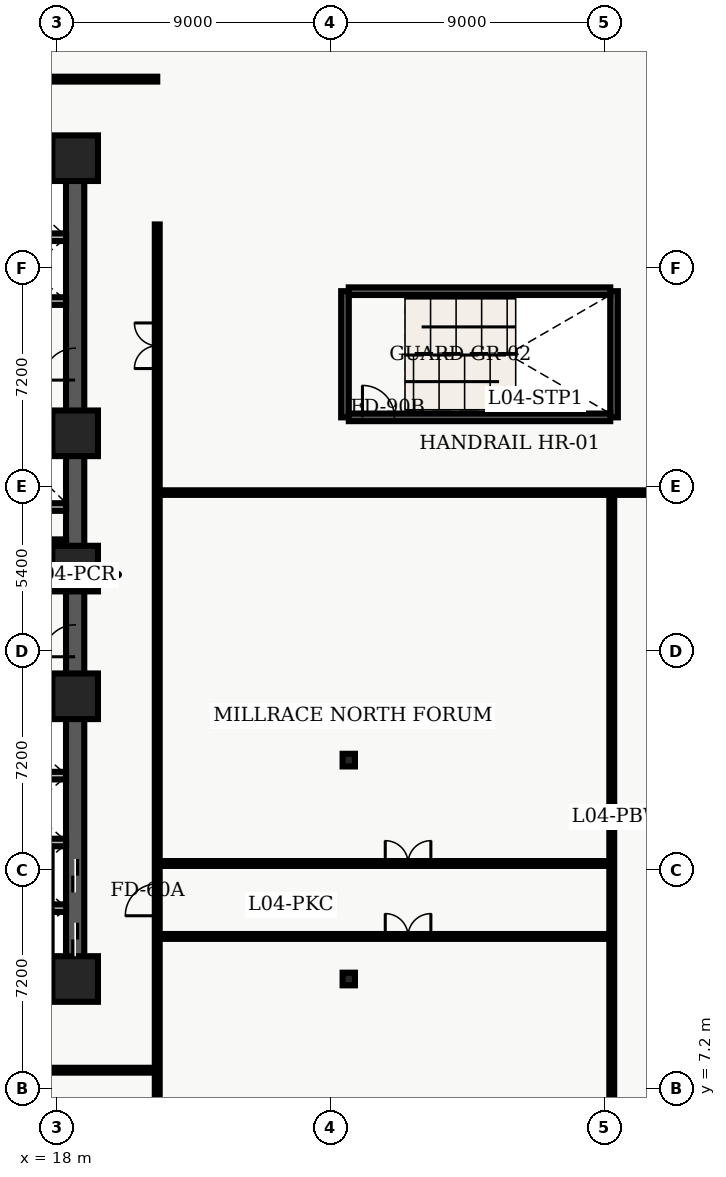
"""IFC4 building model, lengths in metres.
Left out: names, types, materials, properties, quantities, classifications, styles, units other than length and angle.
Written with IfcOpenShell. Run it as: python <this file> out.ifc"""

import sys

from ifc_helpers import new_model, entity, si_unit, converted_unit, direction, frame, origin_with_axes, origin_2d_with_axis, place, context, subcontext, project, spatial, polyline, rectangle, i_section, outline, extrude, element, fill, save


model = new_model("IFC4")
c1 = context("Model", 3, precision=1e-05, world=origin_with_axes(), true_north=direction((0.0, 1.0)))
c2 = subcontext(c1, "Body", "Model", "MODEL_VIEW")
j1 = project(units=[si_unit("LENGTHUNIT", "METRE"), converted_unit("PLANEANGLEUNIT", "DEGREE", entity("IfcPlaneAngleMeasure", 0.017), si_unit("PLANEANGLEUNIT", "RADIAN"), dimensions=[0, 0, 0, 0, 0, 0, 0])], contexts=[c1])
p1 = place(None, origin_with_axes())
s1 = spatial("IfcSite", under=j1, at=p1, CompositionType="ELEMENT")
p2 = place(p1, origin_with_axes())
s2 = spatial("IfcBuilding", under=s1, at=p2, CompositionType="ELEMENT")
p3 = place(p2, frame((0.0, 0.0, 19.8), z_axis=(0.0, 0.0, 1.0), x_axis=(1.0, 0.0, 0.0)))
s3 = spatial("IfcBuildingStorey", under=s2, at=p3, CompositionType="ELEMENT", Elevation=19.8)
p4 = place(p3, frame((11.4, 10.8, 0.0), z_axis=(0.0, 0.0, 1.0), x_axis=(1.0, 0.0, 0.0)))
e1 = element("IfcWall", 1, at=p4, inside=s3, PredefinedType="SHEAR", context=c2, shape_type="SweptSolid", body=[
    extrude(outline(polyline([(0.0, -0.3), (7.2, -0.3), (7.2, 0.3), (0.0, 0.3), (0.0, -0.3)])), origin_with_axes(), (0.0, 0.0, 1.0), 4.26),
])
p5 = place(p4, frame((2.625, 0.0, 0.0), z_axis=(0.0, 0.0, 1.0), x_axis=(1.0, 0.0, 0.0)))
e2 = element("IfcOpeningElement", 2, at=p5, cuts=e1, PredefinedType="OPENING", context=c2, shape_type="SweptSolid", body=[
    extrude(rectangle(XDim=1.05, YDim=0.62, at=origin_2d_with_axis()), origin_with_axes(), (0.0, 0.0, 1.0), 2.15),
])
p6 = place(p3, frame((11.4, 37.8, 0.0), z_axis=(0.0, 0.0, 1.0), x_axis=(1.0, 0.0, 0.0)))
e3 = element("IfcWall", 3, at=p6, inside=s3, PredefinedType="SHEAR", context=c2, shape_type="SweptSolid", body=[
    extrude(outline(polyline([(0.0, -0.3), (7.2, -0.3), (7.2, 0.3), (0.0, 0.3), (0.0, -0.3)])), origin_with_axes(), (0.0, 0.0, 1.0), 4.26),
])
p7 = place(p6, frame((2.625, 0.0, 0.0), z_axis=(0.0, 0.0, 1.0), x_axis=(1.0, 0.0, 0.0)))
e4 = element("IfcOpeningElement", 4, at=p7, cuts=e3, PredefinedType="OPENING", context=c2, shape_type="SweptSolid", body=[
    extrude(rectangle(XDim=1.05, YDim=0.62, at=origin_2d_with_axis()), origin_with_axes(), (0.0, 0.0, 1.0), 2.15),
])
p8 = place(p3, frame((18.6, 10.8, 0.0), z_axis=(0.0, 0.0, 1.0), x_axis=(0.0, 1.0, 0.0)))
e5 = element("IfcWall", 5, at=p8, inside=s3, PredefinedType="SHEAR", context=c2, shape_type="SweptSolid", body=[
    extrude(outline(polyline([(0.0, -0.3), (13.5, -0.3), (13.5, 0.3), (0.0, 0.3), (0.0, -0.3)])), origin_with_axes(), (0.0, 0.0, 1.0), 4.26),
])
p9 = place(p8, frame((1.3, 0.0, 0.0), z_axis=(0.0, 0.0, 1.0), x_axis=(1.0, 0.0, 0.0)))
e6 = element("IfcOpeningElement", 6, at=p9, cuts=e5, PredefinedType="OPENING", context=c2, shape_type="SweptSolid", body=[
    extrude(rectangle(XDim=1.1, YDim=0.62, at=origin_2d_with_axis()), origin_with_axes(), (0.0, 0.0, 1.0), 2.15),
])
p10 = place(p8, frame((3.4, 0.0, 0.0), z_axis=(0.0, 0.0, 1.0), x_axis=(1.0, 0.0, 0.0)))
e7 = element("IfcOpeningElement", 7, at=p10, cuts=e5, PredefinedType="OPENING", context=c2, shape_type="SweptSolid", body=[
    extrude(rectangle(XDim=1.1, YDim=0.62, at=origin_2d_with_axis()), origin_with_axes(), (0.0, 0.0, 1.0), 2.15),
])
p11 = place(p8, frame((11.125, 0.0, 0.0), z_axis=(0.0, 0.0, 1.0), x_axis=(1.0, 0.0, 0.0)))
e8 = element("IfcOpeningElement", 8, at=p11, cuts=e5, PredefinedType="OPENING", context=c2, shape_type="SweptSolid", body=[
    extrude(rectangle(XDim=1.05, YDim=0.62, at=origin_2d_with_axis()), origin_with_axes(), (0.0, 0.0, 1.0), 2.15),
])
p12 = place(p3, frame((18.6, 24.3, 0.0), z_axis=(0.0, 0.0, 1.0), x_axis=(0.0, 1.0, 0.0)))
e9 = element("IfcWall", 9, at=p12, inside=s3, PredefinedType="SHEAR", context=c2, shape_type="SweptSolid", body=[
    extrude(outline(polyline([(0.0, -0.3), (13.5, -0.3), (13.5, 0.3), (0.0, 0.3), (0.0, -0.3)])), origin_with_axes(), (0.0, 0.0, 1.0), 4.26),
])
p13 = place(p12, frame((6.725, 0.0, 0.0), z_axis=(0.0, 0.0, 1.0), x_axis=(1.0, 0.0, 0.0)))
e10 = element("IfcOpeningElement", 10, at=p13, cuts=e9, PredefinedType="OPENING", context=c2, shape_type="SweptSolid", body=[
    extrude(rectangle(XDim=1.05, YDim=0.62, at=origin_2d_with_axis()), origin_with_axes(), (0.0, 0.0, 1.0), 2.15),
])
for number, where, z_axis, x_axis in (
    (11, (11.7, 19.825, 0.0), (0.0, 0.0, 1.0), (1.0, 0.0, 0.0)),
    (12, (11.7, 28.775, 0.0), (0.0, 0.0, 1.0), (1.0, 0.0, 0.0)),
):
    element("IfcWall", number, at=place(p3, frame(where, z_axis=z_axis, x_axis=x_axis)), inside=s3, PredefinedType="SHEAR", context=c2, shape_type="SweptSolid", body=[
        extrude(outline(polyline([(0.0, -0.125), (6.6, -0.125), (6.6, 0.125), (0.0, 0.125), (0.0, -0.125)])), origin_with_axes(), (0.0, 0.0, 1.0), 4.26),
    ])
p14 = place(p3, frame((11.7, 24.1, 0.0), z_axis=(0.0, 0.0, 1.0), x_axis=(1.0, 0.0, 0.0)))
e13 = element("IfcWall", 13, at=p14, inside=s3, PredefinedType="SOLIDWALL", context=c2, shape_type="SweptSolid", body=[
    extrude(outline(polyline([(0.0, -0.125), (6.6, -0.125), (6.6, 0.125), (0.0, 0.125), (0.0, -0.125)])), origin_with_axes(), (0.0, 0.0, 1.0), 3.3),
])
p15 = place(p14, frame((3.75, 0.0, 0.0), z_axis=(0.0, 0.0, 1.0), x_axis=(1.0, 0.0, 0.0)))
e14 = element("IfcOpeningElement", 14, at=p15, cuts=e13, PredefinedType="OPENING", context=c2, shape_type="SweptSolid", body=[
    extrude(rectangle(XDim=0.9, YDim=0.27, at=origin_2d_with_axis()), origin_with_axes(), (0.0, 0.0, 1.0), 2.15),
])
p16 = place(p3, frame((11.7, 26.325, 0.0), z_axis=(0.0, 0.0, 1.0), x_axis=(1.0, 0.0, 0.0)))
e15 = element("IfcWall", 15, at=p16, inside=s3, PredefinedType="SOLIDWALL", context=c2, shape_type="SweptSolid", body=[
    extrude(outline(polyline([(0.0, -0.125), (6.6, -0.125), (6.6, 0.125), (0.0, 0.125), (0.0, -0.125)])), origin_with_axes(), (0.0, 0.0, 1.0), 3.3),
])
p17 = place(p16, frame((3.5, 0.0, 0.0), z_axis=(0.0, 0.0, 1.0), x_axis=(1.0, 0.0, 0.0)))
e16 = element("IfcOpeningElement", 16, at=p17, cuts=e15, PredefinedType="OPENING", context=c2, shape_type="SweptSolid", body=[
    extrude(rectangle(XDim=0.9, YDim=0.27, at=origin_2d_with_axis()), origin_with_axes(), (0.0, 0.0, 1.0), 2.15),
])
for number, where, z_axis, x_axis in (
    (17, (27.475, 29.275, 0.0), (0.0, 0.0, 1.0), (0.0, 1.0, 0.0)),
    (18, (36.325, 29.275, 0.0), (0.0, 0.0, 1.0), (0.0, 1.0, 0.0)),
):
    element("IfcWall", number, at=place(p3, frame(where, z_axis=z_axis, x_axis=x_axis)), inside=s3, PredefinedType="SHEAR", context=c2, shape_type="SweptSolid", body=[
        extrude(outline(polyline([(0.0, -0.125), (4.15, -0.125), (4.15, 0.125), (0.0, 0.125), (0.0, -0.125)])), origin_with_axes(), (0.0, 0.0, 1.0), 4.26),
    ])
p18 = place(p3, frame((27.6, 29.275, 0.0), z_axis=(0.0, 0.0, 1.0), x_axis=(1.0, 0.0, 0.0)))
e19 = element("IfcWall", 19, at=p18, inside=s3, PredefinedType="SHEAR", context=c2, shape_type="SweptSolid", body=[
    extrude(outline(polyline([(0.0, -0.125), (8.6, -0.125), (8.6, 0.125), (0.0, 0.125), (0.0, -0.125)])), origin_with_axes(), (0.0, 0.0, 1.0), 4.26),
])
p19 = place(p18, frame((0.975, 0.0, 0.0), z_axis=(0.0, 0.0, 1.0), x_axis=(1.0, 0.0, 0.0)))
e20 = element("IfcOpeningElement", 20, at=p19, cuts=e19, PredefinedType="OPENING", context=c2, shape_type="SweptSolid", body=[
    extrude(rectangle(XDim=1.05, YDim=0.27, at=origin_2d_with_axis()), origin_with_axes(), (0.0, 0.0, 1.0), 2.15),
])
p20 = place(p3, frame((27.6, 33.425, 0.0), z_axis=(0.0, 0.0, 1.0), x_axis=(1.0, 0.0, 0.0)))
e21 = element("IfcWall", 21, at=p20, inside=s3, PredefinedType="SHEAR", context=c2, shape_type="SweptSolid", body=[
    extrude(outline(polyline([(0.0, -0.125), (8.6, -0.125), (8.6, 0.125), (0.0, 0.125), (0.0, -0.125)])), origin_with_axes(), (0.0, 0.0, 1.0), 4.26),
])
for number, where, z_axis, x_axis in (
    (22, (18.6, 10.8, 0.0), (0.0, 0.0, 1.0), (1.0, 0.0, 0.0)),
    (23, (18.6, 20.1, 0.0), (0.0, 0.0, 1.0), (1.0, 0.0, 0.0)),
    (24, (18.6, 24.3, 0.0), (0.0, 0.0, 1.0), (1.0, 0.0, 0.0)),
    (25, (18.6, 28.75, 0.0), (0.0, 0.0, 1.0), (1.0, 0.0, 0.0)),
    (26, (18.6, 37.8, 0.0), (0.0, 0.0, 1.0), (1.0, 0.0, 0.0)),
):
    element("IfcColumn", number, at=place(p3, frame(where, z_axis=z_axis, x_axis=x_axis)), inside=s3, PredefinedType="COLUMN", context=c2, shape_type="SweptSolid", body=[
        extrude(rectangle(XDim=1.5, YDim=1.5, at=origin_2d_with_axis()), origin_with_axes(), (0.0, 0.0, 1.0), 4.5),
    ])
for number, where, z_axis, x_axis in (
    (27, (27.6, 10.8, 0.0), (0.0, 0.0, 1.0), (1.0, 0.0, 0.0)),
    (28, (27.6, 18.0, 0.0), (0.0, 0.0, 1.0), (1.0, 0.0, 0.0)),
):
    element("IfcColumn", number, at=place(p3, frame(where, z_axis=z_axis, x_axis=x_axis)), inside=s3, PredefinedType="COLUMN", context=c2, shape_type="SweptSolid", body=[
        extrude(i_section(OverallWidth=0.406, OverallDepth=0.416, WebThickness=0.03, FlangeThickness=0.048, FilletRadius=0.022, at=origin_2d_with_axis()), origin_with_axes(), (0.0, 0.0, 1.0), 4.5),
    ])
p21 = place(p3, frame((14.62, 25.18, 0.0), z_axis=(0.0, 0.0, 1.0), x_axis=(1.0, 0.0, 0.0)))
e29 = element("IfcWall", 29, at=p21, inside=s3, PredefinedType="PARTITIONING", context=c2, shape_type="SweptSolid", body=[
    extrude(outline(polyline([(0.0, -0.08), (3.68, -0.08), (3.68, 0.08), (0.0, 0.08), (0.0, -0.08)])), origin_with_axes(), (0.0, 0.0, 1.0), 3.2),
])
p22 = place(p21, frame((1.95, 0.0, 0.0), z_axis=(0.0, 0.0, 1.0), x_axis=(1.0, 0.0, 0.0)))
e30 = element("IfcOpeningElement", 30, at=p22, cuts=e29, PredefinedType="OPENING", context=c2, shape_type="SweptSolid", body=[
    extrude(rectangle(XDim=0.9, YDim=0.18, at=origin_2d_with_axis()), origin_with_axes(), (0.0, 0.0, 1.0), 2.15),
])
for number, where, z_axis, x_axis in (
    (31, (15.84, 13.13, 0.0), (0.0, 0.0, 1.0), (1.0, 0.0, 0.0)),
    (32, (15.84, 15.29, 0.0), (0.0, 0.0, 1.0), (1.0, 0.0, 0.0)),
    (33, (15.84, 17.49, 0.0), (0.0, 0.0, 1.0), (1.0, 0.0, 0.0)),
    (34, (15.84, 33.1, 0.0), (0.0, 0.0, 1.0), (1.0, 0.0, 0.0)),
    (35, (15.84, 35.2, 0.0), (0.0, 0.0, 1.0), (1.0, 0.0, 0.0)),
):
    element("IfcWall", number, at=place(p3, frame(where, z_axis=z_axis, x_axis=x_axis)), inside=s3, PredefinedType="SOLIDWALL", context=c2, shape_type="SweptSolid", body=[
        extrude(outline(polyline([(0.0, -0.125), (2.46, -0.125), (2.46, 0.125), (0.0, 0.125), (0.0, -0.125)])), origin_with_axes(), (0.0, 0.0, 1.0), 3.2),
    ])
p23 = place(p3, frame((0.38, 7.8, 0.0), z_axis=(0.0, 0.0, 1.0), x_axis=(1.0, 0.0, 0.0)))
e36 = element("IfcWall", 36, at=p23, inside=s3, PredefinedType="PARTITIONING", context=c2, shape_type="SweptSolid", body=[
    extrude(outline(polyline([(0.0, -0.08), (20.92, -0.08), (20.92, 0.08), (0.0, 0.08), (0.0, -0.08)])), origin_with_axes(), (0.0, 0.0, 1.0), 3.2),
])
p24 = place(p23, frame((3.7, 0.0, 0.0), z_axis=(0.0, 0.0, 1.0), x_axis=(1.0, 0.0, 0.0)))
e37 = element("IfcOpeningElement", 37, at=p24, cuts=e36, PredefinedType="OPENING", context=c2, shape_type="SweptSolid", body=[
    extrude(rectangle(XDim=1.0, YDim=0.18, at=origin_2d_with_axis()), origin_with_axes(), (0.0, 0.0, 1.0), 2.15),
])
p25 = place(p23, frame((15.3, 0.0, 0.0), z_axis=(0.0, 0.0, 1.0), x_axis=(1.0, 0.0, 0.0)))
e38 = element("IfcOpeningElement", 38, at=p25, cuts=e36, PredefinedType="OPENING", context=c2, shape_type="SweptSolid", body=[
    extrude(rectangle(XDim=1.0, YDim=0.18, at=origin_2d_with_axis()), origin_with_axes(), (0.0, 0.0, 1.0), 2.15),
])
p26 = place(p3, frame((0.38, 40.4, 0.0), z_axis=(0.0, 0.0, 1.0), x_axis=(1.0, 0.0, 0.0)))
e39 = element("IfcWall", 39, at=p26, inside=s3, PredefinedType="PARTITIONING", context=c2, shape_type="SweptSolid", body=[
    extrude(outline(polyline([(0.0, -0.08), (20.92, -0.08), (20.92, 0.08), (0.0, 0.08), (0.0, -0.08)])), origin_with_axes(), (0.0, 0.0, 1.0), 3.2),
])
p27 = place(p26, frame((15.25, 0.0, 0.0), z_axis=(0.0, 0.0, 1.0), x_axis=(1.0, 0.0, 0.0)))
e40 = element("IfcOpeningElement", 40, at=p27, cuts=e39, PredefinedType="OPENING", context=c2, shape_type="SweptSolid", body=[
    extrude(rectangle(XDim=1.5, YDim=0.18, at=origin_2d_with_axis()), origin_with_axes(), (0.0, 0.0, 1.0), 2.2),
])
p28 = place(p3, frame((21.3, 0.38, 0.0), z_axis=(0.0, 0.0, 1.0), x_axis=(0.0, 1.0, 0.0)))
e41 = element("IfcWall", 41, at=p28, inside=s3, PredefinedType="PARTITIONING", context=c2, shape_type="SweptSolid", body=[
    extrude(outline(polyline([(0.0, -0.08), (35.24, -0.08), (35.24, 0.08), (0.0, 0.08), (0.0, -0.08)])), origin_with_axes(), (0.0, 0.0, 1.0), 3.2),
])
p29 = place(p28, frame((13.025, 0.0, 0.0), z_axis=(0.0, 0.0, 1.0), x_axis=(1.0, 0.0, 0.0)))
e42 = element("IfcOpeningElement", 42, at=p29, cuts=e41, PredefinedType="OPENING", context=c2, shape_type="SweptSolid", body=[
    extrude(rectangle(XDim=1.05, YDim=0.18, at=origin_2d_with_axis()), origin_with_axes(), (0.0, 0.0, 1.0), 2.15),
])
p30 = place(p28, frame((31.25, 0.0, 0.0), z_axis=(0.0, 0.0, 1.0), x_axis=(1.0, 0.0, 0.0)))
e43 = element("IfcOpeningElement", 43, at=p30, cuts=e41, PredefinedType="OPENING", context=c2, shape_type="SweptSolid", body=[
    extrude(rectangle(XDim=1.5, YDim=0.18, at=origin_2d_with_axis()), origin_with_axes(), (0.0, 0.0, 1.0), 2.2),
])
p31 = place(p3, frame((21.3, 12.2, 0.0), z_axis=(0.0, 0.0, 1.0), x_axis=(1.0, 0.0, 0.0)))
e44 = element("IfcWall", 44, at=p31, inside=s3, PredefinedType="PARTITIONING", context=c2, shape_type="SweptSolid", body=[
    extrude(outline(polyline([(0.0, -0.08), (14.95, -0.08), (14.95, 0.08), (0.0, 0.08), (0.0, -0.08)])), origin_with_axes(), (0.0, 0.0, 1.0), 3.2),
])
p32 = place(p31, frame((8.25, 0.0, 0.0), z_axis=(0.0, 0.0, 1.0), x_axis=(1.0, 0.0, 0.0)))
e45 = element("IfcOpeningElement", 45, at=p32, cuts=e44, PredefinedType="OPENING", context=c2, shape_type="SweptSolid", body=[
    extrude(rectangle(XDim=1.5, YDim=0.18, at=origin_2d_with_axis()), origin_with_axes(), (0.0, 0.0, 1.0), 2.2),
])
p33 = place(p3, frame((21.3, 14.6, 0.0), z_axis=(0.0, 0.0, 1.0), x_axis=(1.0, 0.0, 0.0)))
e46 = element("IfcWall", 46, at=p33, inside=s3, PredefinedType="PARTITIONING", context=c2, shape_type="SweptSolid", body=[
    extrude(outline(polyline([(0.0, -0.08), (14.95, -0.08), (14.95, 0.08), (0.0, 0.08), (0.0, -0.08)])), origin_with_axes(), (0.0, 0.0, 1.0), 3.2),
])
p34 = place(p33, frame((8.25, 0.0, 0.0), z_axis=(0.0, 0.0, 1.0), x_axis=(1.0, 0.0, 0.0)))
e47 = element("IfcOpeningElement", 47, at=p34, cuts=e46, PredefinedType="OPENING", context=c2, shape_type="SweptSolid", body=[
    extrude(rectangle(XDim=1.5, YDim=0.18, at=origin_2d_with_axis()), origin_with_axes(), (0.0, 0.0, 1.0), 2.2),
])
p35 = place(p3, frame((36.25, 4.3, 0.0), z_axis=(0.0, 0.0, 1.0), x_axis=(0.0, 1.0, 0.0)))
e48 = element("IfcWall", 48, at=p35, inside=s3, PredefinedType="PARTITIONING", context=c2, shape_type="SweptSolid", body=[
    extrude(outline(polyline([(0.0, -0.08), (22.5, -0.08), (22.5, 0.08), (0.0, 0.08), (0.0, -0.08)])), origin_with_axes(), (0.0, 0.0, 1.0), 3.2),
])
p36 = place(p3, frame((21.3, 26.8, 0.0), z_axis=(0.0, 0.0, 1.0), x_axis=(1.0, 0.0, 0.0)))
e49 = element("IfcWall", 49, at=p36, inside=s3, PredefinedType="PARTITIONING", context=c2, shape_type="SweptSolid", body=[
    extrude(outline(polyline([(0.0, -0.075), (29.25, -0.075), (29.25, 0.075), (0.0, 0.075), (0.0, -0.075)])), origin_with_axes(), (0.0, 0.0, 1.0), 3.2),
])
p37 = place(p8, frame((1.3, 0.0, 0.0), z_axis=(0.0, 0.0, 1.0), x_axis=(1.0, 0.0, 0.0)))
e50 = element("IfcDoor", 50, at=p37, inside=s3, OperationType="SLIDING_TO_LEFT", PredefinedType="DOOR", context=c2, shape_type="SweptSolid", body=[
    extrude(rectangle(XDim=1.1, YDim=0.09, at=origin_2d_with_axis()), origin_with_axes(), (0.0, 0.0, 1.0), 2.15),
])
fill(e6, e50)
p38 = place(p8, frame((3.4, 0.0, 0.0), z_axis=(0.0, 0.0, 1.0), x_axis=(1.0, 0.0, 0.0)))
e51 = element("IfcDoor", 51, at=p38, inside=s3, OperationType="SLIDING_TO_RIGHT", PredefinedType="DOOR", context=c2, shape_type="SweptSolid", body=[
    extrude(rectangle(XDim=1.1, YDim=0.09, at=origin_2d_with_axis()), origin_with_axes(), (0.0, 0.0, 1.0), 2.15),
])
fill(e7, e51)
p39 = place(p8, frame((11.125, 0.0, 0.0), z_axis=(0.0, 0.0, 1.0), x_axis=(1.0, 0.0, 0.0)))
e52 = element("IfcDoor", 52, at=p39, inside=s3, OperationType="SINGLE_SWING_LEFT", PredefinedType="DOOR", context=c2, shape_type="SweptSolid", body=[
    extrude(rectangle(XDim=1.05, YDim=0.09, at=origin_2d_with_axis()), origin_with_axes(), (0.0, 0.0, 1.0), 2.15),
])
fill(e8, e52)
p40 = place(p12, frame((6.725, 0.0, 0.0), z_axis=(0.0, 0.0, 1.0), x_axis=(1.0, 0.0, 0.0)))
e53 = element("IfcDoor", 53, at=p40, inside=s3, OperationType="SINGLE_SWING_LEFT", PredefinedType="DOOR", context=c2, shape_type="SweptSolid", body=[
    extrude(rectangle(XDim=1.05, YDim=0.09, at=origin_2d_with_axis()), origin_with_axes(), (0.0, 0.0, 1.0), 2.15),
])
fill(e10, e53)
p41 = place(p18, frame((0.975, 0.0, 0.0), z_axis=(0.0, 0.0, 1.0), x_axis=(1.0, 0.0, 0.0)))
e54 = element("IfcDoor", 54, at=p41, inside=s3, OperationType="SINGLE_SWING_LEFT", PredefinedType="DOOR", context=c2, shape_type="SweptSolid", body=[
    extrude(rectangle(XDim=1.05, YDim=0.09, at=origin_2d_with_axis()), origin_with_axes(), (0.0, 0.0, 1.0), 2.15),
])
fill(e20, e54)
p42 = place(p28, frame((13.025, 0.0, 0.0), z_axis=(0.0, 0.0, 1.0), x_axis=(1.0, 0.0, 0.0)))
e55 = element("IfcDoor", 55, at=p42, inside=s3, OperationType="SINGLE_SWING_LEFT", PredefinedType="DOOR", context=c2, shape_type="SweptSolid", body=[
    extrude(rectangle(XDim=1.05, YDim=0.09, at=origin_2d_with_axis()), origin_with_axes(), (0.0, 0.0, 1.0), 2.15),
])
fill(e42, e55)
p43 = place(p31, frame((8.25, 0.0, 0.0), z_axis=(0.0, 0.0, 1.0), x_axis=(1.0, 0.0, 0.0)))
e56 = element("IfcDoor", 56, at=p43, inside=s3, OperationType="DOUBLE_DOOR_SINGLE_SWING", PredefinedType="DOOR", context=c2, shape_type="SweptSolid", body=[
    extrude(rectangle(XDim=1.5, YDim=0.09, at=origin_2d_with_axis()), origin_with_axes(), (0.0, 0.0, 1.0), 2.2),
])
fill(e45, e56)
p44 = place(p33, frame((8.25, 0.0, 0.0), z_axis=(0.0, 0.0, 1.0), x_axis=(1.0, 0.0, 0.0)))
e57 = element("IfcDoor", 57, at=p44, inside=s3, OperationType="DOUBLE_DOOR_SINGLE_SWING", PredefinedType="DOOR", context=c2, shape_type="SweptSolid", body=[
    extrude(rectangle(XDim=1.5, YDim=0.09, at=origin_2d_with_axis()), origin_with_axes(), (0.0, 0.0, 1.0), 2.2),
])
fill(e47, e57)
p45 = place(p28, frame((31.25, 0.0, 0.0), z_axis=(0.0, 0.0, 1.0), x_axis=(1.0, 0.0, 0.0)))
e58 = element("IfcDoor", 58, at=p45, inside=s3, OperationType="DOUBLE_DOOR_SINGLE_SWING", PredefinedType="DOOR", context=c2, shape_type="SweptSolid", body=[
    extrude(rectangle(XDim=1.5, YDim=0.09, at=origin_2d_with_axis()), origin_with_axes(), (0.0, 0.0, 1.0), 2.2),
])
fill(e43, e58)
save(model, sys.argv[1])
